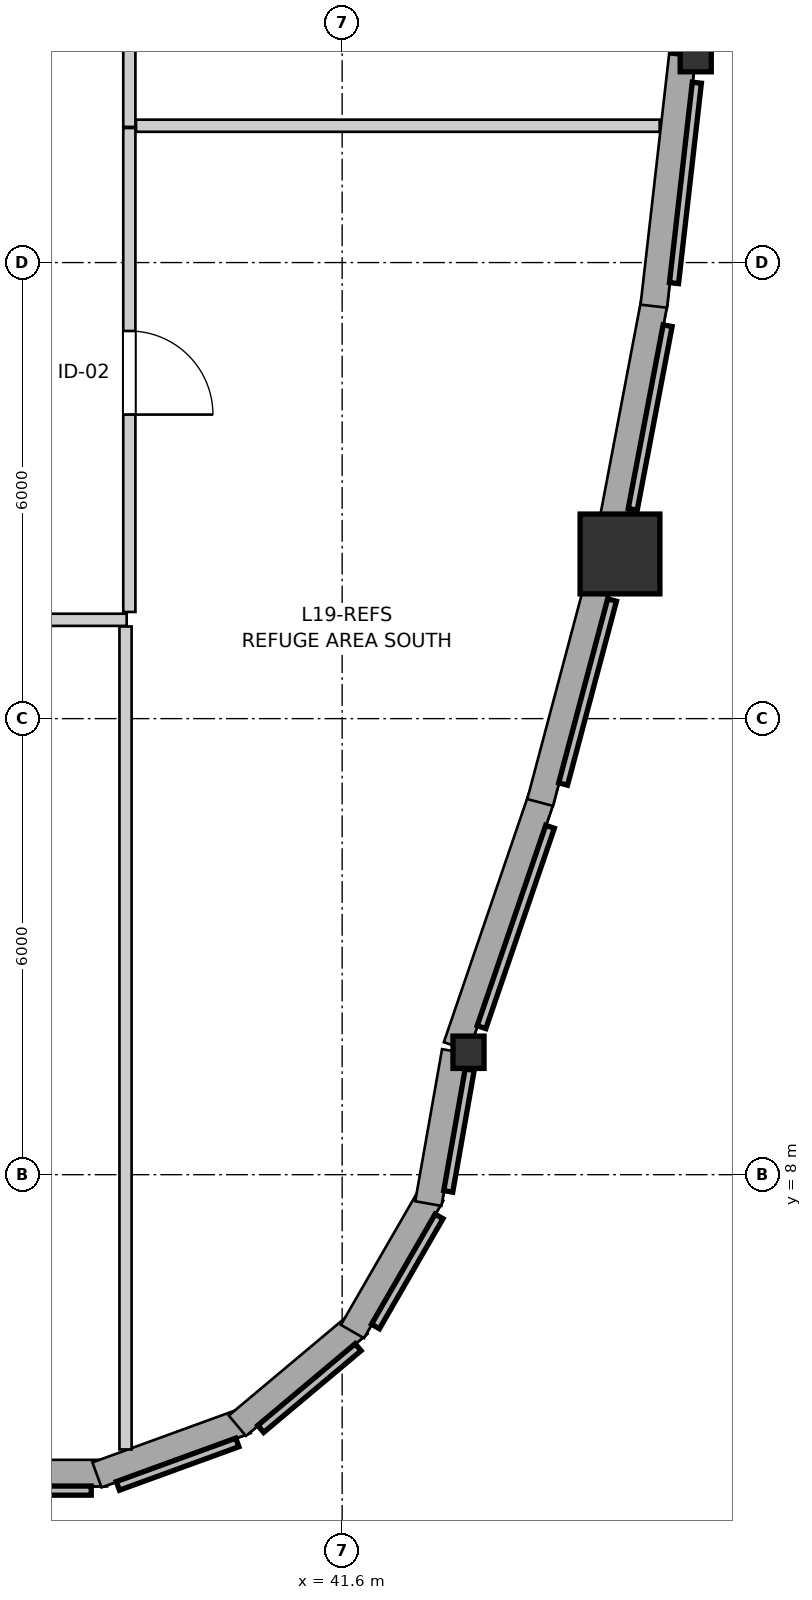
"""IFC4 building model, lengths in metres.
Left out: names, types, materials, properties, quantities, classifications, styles, units other than length and angle.
Written with IfcOpenShell. Run it as: python <this file> out.ifc"""

import sys

from ifc_helpers import new_model, si_unit, direction, frame, frame_2d, origin, origin_2d, place, context, subcontext, project, spatial, rectangle, i_section, extrude, source, transform, mapped, element, fill, save


model = new_model("IFC4")
c1 = context("Model", 3, precision=1e-05, world=origin(), true_north=direction((0.0, 1.0)))
c2 = subcontext(c1, "Body", "Model", "MODEL_VIEW")
j1 = project(units=[si_unit("LENGTHUNIT", "METRE"), si_unit("PLANEANGLEUNIT", "RADIAN")], contexts=[c1])
p1 = place(None, origin())
s1 = spatial("IfcSite", under=j1, at=p1, CompositionType="ELEMENT")
p2 = place(p1, origin())
s2 = spatial("IfcBuilding", under=s1, at=p2, CompositionType="ELEMENT")
p3 = place(p2, frame((0.0, 0.0, 65.4)))
s3 = spatial("IfcBuildingStorey", under=s2, at=p3, CompositionType="ELEMENT", Elevation=65.4)
m1 = source(origin(), c2, "Body", "SweptSolid", [
    extrude(i_section(OverallWidth=0.409, OverallDepth=0.425, WebThickness=0.03, FlangeThickness=0.048, FilletRadius=0.015, at=origin_2d()), origin(), (0.0, 0.0, 1.0), 4.75),
])
p4 = place(p3, frame((43.262, 9.611, 0.0), z_axis=(0.0, 0.0, 1.0), x_axis=(1.0, 0.0, 0.0)))
e1 = element("IfcColumn", 1, at=p4, inside=s3, PredefinedType="PILASTER", context=c2, shape_type="MappedRepresentation", body=[
    mapped(m1, transform((0.0, 0.0, 0.0), x_axis=(1.0, 0.0, 0.0), y_axis=(0.0, 1.0, 0.0), z_axis=(0.0, 0.0, 1.0), scale=1.0)),
])
m2 = source(origin(), c2, "Body", "SweptSolid", [
    extrude(rectangle(XDim=1.05, YDim=1.05, at=origin_2d()), origin(), (0.0, 0.0, 1.0), 4.75),
])
p5 = place(p3, frame((45.256, 16.166, 0.0), z_axis=(0.0, 0.0, 1.0), x_axis=(1.0, 0.0, 0.0)))
e2 = element("IfcColumn", 2, at=p5, inside=s3, PredefinedType="COLUMN", context=c2, shape_type="MappedRepresentation", body=[
    mapped(m2, transform((0.0, 0.0, 0.0), x_axis=(1.0, 0.0, 0.0), y_axis=(0.0, 1.0, 0.0), z_axis=(0.0, 0.0, 1.0), scale=1.0)),
])
p6 = place(p3, frame((46.252, 22.722, 0.0), z_axis=(0.0, 0.0, 1.0), x_axis=(1.0, 0.0, 0.0)))
e3 = element("IfcColumn", 3, at=p6, inside=s3, PredefinedType="PILASTER", context=c2, shape_type="MappedRepresentation", body=[
    mapped(m1, transform((0.0, 0.0, 0.0), x_axis=(1.0, 0.0, 0.0), y_axis=(0.0, 1.0, 0.0), z_axis=(0.0, 0.0, 1.0), scale=1.0)),
])
p7 = place(p3, frame((36.417, 4.073, 0.0), z_axis=(0.0, 0.0, 1.0), x_axis=(1.0, 0.0, 0.0)))
e4 = element("IfcWall", 4, at=p7, inside=s3, PredefinedType="SOLIDWALL", context=c2, shape_type="SweptSolid", body=[
    extrude(rectangle(XDim=2.091, YDim=0.35, at=frame_2d((1.045, 0.0))), origin(), (0.0, 0.0, 1.0), 4.23),
])
for number, where, z_axis, x_axis in (
    (5, (38.374, 4.05, 0.0), (0.0, 0.0, 1.0), (0.94, 0.342, 0.0)),
    (6, (40.221, 4.697, 0.0), (0.0, 0.0, 1.0), (0.766, 0.643, 0.0)),
    (7, (41.735, 5.937, 0.0), (0.0, 0.0, 1.0), (0.5, 0.866, 0.0)),
):
    element("IfcWall", number, at=place(p3, frame(where, z_axis=z_axis, x_axis=x_axis)), inside=s3, PredefinedType="SOLIDWALL", context=c2, shape_type="SweptSolid", body=[
        extrude(rectangle(XDim=2.09, YDim=0.35, at=frame_2d((1.045, 0.0))), origin(), (0.0, 0.0, 1.0), 4.23),
    ])
p8 = place(p3, frame((42.734, 7.62, 0.0), z_axis=(0.0, 0.0, 1.0), x_axis=(0.173607131876, 0.984814989611, 0.0)))
e8 = element("IfcWall", 8, at=p8, inside=s3, PredefinedType="SOLIDWALL", context=c2, shape_type="SweptSolid", body=[
    extrude(rectangle(XDim=2.032, YDim=0.35, at=frame_2d((1.016, 0.0))), origin(), (0.0, 0.0, 1.0), 4.23),
])
p9 = place(p3, frame((43.104, 9.686, 0.0), z_axis=(0.0, 0.0, 1.0), x_axis=(0.323558843572, 0.946208050455, 0.0)))
e9 = element("IfcWall", 9, at=p9, inside=s3, PredefinedType="SOLIDWALL", context=c2, shape_type="SweptSolid", body=[
    extrude(rectangle(XDim=3.482, YDim=0.35, at=frame_2d((1.741, 0.0))), origin(), (0.0, 0.0, 1.0), 4.23),
])
p10 = place(p3, frame((44.205, 12.897, 0.0), z_axis=(0.0, 0.0, 1.0), x_axis=(0.257099428233, 0.966384956424, 0.0)))
e10 = element("IfcWall", 10, at=p10, inside=s3, PredefinedType="SOLIDWALL", context=c2, shape_type="SweptSolid", body=[
    extrude(rectangle(XDim=3.13, YDim=0.35, at=frame_2d((1.565, 0.0))), origin(), (0.0, 0.0, 1.0), 4.23),
])
p11 = place(p3, frame((45.14, 16.494, 0.0), z_axis=(0.0, 0.0, 1.0), x_axis=(0.186608529586, 0.982434352354, 0.0)))
e11 = element("IfcWall", 11, at=p11, inside=s3, PredefinedType="SOLIDWALL", context=c2, shape_type="SweptSolid", body=[
    extrude(rectangle(XDim=3.074, YDim=0.35, at=frame_2d((1.537, 0.0))), origin(), (0.0, 0.0, 1.0), 4.23),
])
p12 = place(p3, frame((45.7, 19.426, 0.0), z_axis=(0.0, 0.0, 1.0), x_axis=(0.113266370988, 0.993564657787, 0.0)))
e12 = element("IfcWall", 12, at=p12, inside=s3, PredefinedType="SOLIDWALL", context=c2, shape_type="SweptSolid", body=[
    extrude(rectangle(XDim=3.317, YDim=0.35, at=frame_2d((1.659, 0.0))), origin(), (0.0, 0.0, 1.0), 4.23),
])
p13 = place(p3, frame((46.078, 22.749, 0.0), z_axis=(0.0, 0.0, 1.0), x_axis=(0.037972593677, 0.999278780986, 0.0)))
e13 = element("IfcWall", 13, at=p13, inside=s3, PredefinedType="SOLIDWALL", context=c2, shape_type="SweptSolid", body=[
    extrude(rectangle(XDim=3.298, YDim=0.35, at=frame_2d((1.649, 0.0))), origin(), (0.0, 0.0, 1.0), 4.23),
])
p14 = place(p3, frame((38.765, 15.3, 0.0), z_axis=(0.0, 0.0, 1.0), x_axis=(-1.0, 0.0, 0.0)))
e14 = element("IfcWall", 14, at=p14, inside=s3, PredefinedType="PARTITIONING", context=c2, shape_type="SweptSolid", body=[
    extrude(rectangle(XDim=12.28, YDim=0.16, at=frame_2d((6.14, 0.0))), origin(), (0.0, 0.0, 1.0), 4.75),
])
p15 = place(p14, frame((5.44, 0.0, 0.0)))
e15 = element("IfcOpeningElement", 15, at=p15, cuts=e14, PredefinedType="OPENING", context=c2, shape_type="SweptSolid", body=[
    extrude(rectangle(XDim=1.4, YDim=2.15, at=frame_2d((0.7, 1.075))), frame((0.0, 0.09, 0.0), z_axis=(0.0, -1.0, 0.0), x_axis=(1.0, 0.0, 0.0)), (0.0, 0.0, 1.0), 0.18),
])
p16 = place(p3, frame((38.8, 30.215, 0.0), z_axis=(0.0, 0.0, 1.0), x_axis=(0.0, -1.0, 0.0)))
e16 = element("IfcWall", 16, at=p16, inside=s3, PredefinedType="PARTITIONING", context=c2, shape_type="SweptSolid", body=[
    extrude(rectangle(XDim=8.43, YDim=0.16, at=frame_2d((4.215, 0.0))), origin(), (0.0, 0.0, 1.0), 4.75),
])
p17 = place(p16, frame((3.515, 0.0, 0.0)))
e17 = element("IfcOpeningElement", 17, at=p17, cuts=e16, PredefinedType="OPENING", context=c2, shape_type="SweptSolid", body=[
    extrude(rectangle(XDim=1.4, YDim=2.15, at=frame_2d((0.7, 1.075))), frame((0.0, 0.09, 0.0), z_axis=(0.0, -1.0, 0.0), x_axis=(1.0, 0.0, 0.0)), (0.0, 0.0, 1.0), 0.18),
])
p18 = place(p3, frame((38.8, 21.77, 0.0), z_axis=(0.0, 0.0, 1.0), x_axis=(0.0, -1.0, 0.0)))
e18 = element("IfcWall", 18, at=p18, inside=s3, PredefinedType="PARTITIONING", context=c2, shape_type="SweptSolid", body=[
    extrude(rectangle(XDim=6.367, YDim=0.16, at=frame_2d((3.184, 0.0))), origin(), (0.0, 0.0, 1.0), 4.75),
])
p19 = place(p18, frame((2.67, 0.0, 0.0)))
e19 = element("IfcOpeningElement", 19, at=p19, cuts=e18, PredefinedType="OPENING", context=c2, shape_type="SweptSolid", body=[
    extrude(rectangle(XDim=1.1, YDim=2.15, at=frame_2d((0.55, 1.075))), frame((0.0, 0.09, 0.0), z_axis=(0.0, -1.0, 0.0), x_axis=(1.0, 0.0, 0.0)), (0.0, 0.0, 1.0), 0.18),
])
p20 = place(p3, frame((38.75, 4.385, 0.0), z_axis=(0.0, 0.0, 1.0), x_axis=(0.0, 1.0, 0.0)))
e20 = element("IfcWall", 20, at=p20, inside=s3, PredefinedType="PARTITIONING", context=c2, shape_type="SweptSolid", body=[
    extrude(rectangle(XDim=10.827, YDim=0.16, at=frame_2d((5.414, 0.0))), origin(), (0.0, 0.0, 1.0), 4.75),
])
p21 = place(p3, frame((38.888, 21.8, 0.0), z_axis=(0.0, 0.0, 1.0), x_axis=(1.0, 0.0, 0.0)))
e21 = element("IfcWall", 21, at=p21, inside=s3, PredefinedType="PARTITIONING", context=c2, shape_type="SweptSolid", body=[
    extrude(rectangle(XDim=6.89, YDim=0.16, at=frame_2d((3.445, 0.0))), origin(), (0.0, 0.0, 1.0), 4.75),
])
m3 = source(origin(), c2, "Body", "SweptSolid", [
    extrude(rectangle(XDim=1.1, YDim=2.15, at=frame_2d((0.55, 1.075))), frame((0.0, 0.025, 0.0), z_axis=(0.0, -1.0, 0.0), x_axis=(1.0, 0.0, 0.0)), (0.0, 0.0, 1.0), 0.05),
])
p22 = place(p19, origin())
e22 = element("IfcDoor", 22, at=p22, inside=s3, OperationType="SINGLE_SWING_RIGHT", PredefinedType="DOOR", context=c2, shape_type="MappedRepresentation", body=[
    mapped(m3, transform((0.0, 0.0, 0.0), x_axis=(1.0, 0.0, 0.0), y_axis=(0.0, 1.0, 0.0), z_axis=(0.0, 0.0, 1.0), scale=1.0)),
])
fill(e19, e22)
save(model, sys.argv[1])
